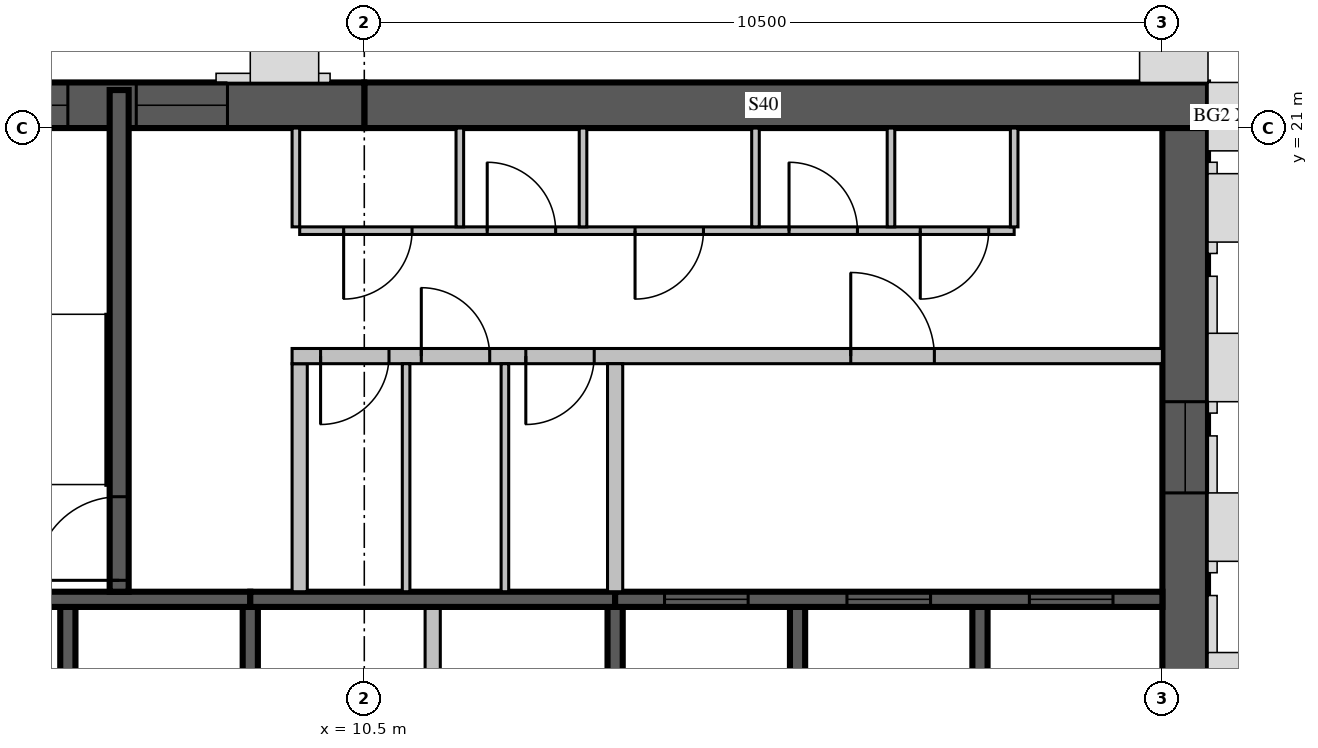
"""IFC4 building model, lengths in metres.
Left out: names, types, materials, properties, quantities, classifications, styles, units other than length and angle.
Written with IfcOpenShell. Run it as: python <this file> out.ifc"""

import sys

from ifc_helpers import new_model, si_unit, direction, frame, frame_2d, origin, place, context, subcontext, project, spatial, rectangle, extrude, source, transform, mapped, element, fill, save


model = new_model("IFC4")
c1 = context("Model", 3, precision=1e-05, world=origin(), true_north=direction((0.0, 1.0)))
c2 = subcontext(c1, "Body", "Model", "MODEL_VIEW")
j1 = project(units=[si_unit("LENGTHUNIT", "METRE"), si_unit("PLANEANGLEUNIT", "RADIAN")], contexts=[c1])
p1 = place(None, origin())
s1 = spatial("IfcSite", under=j1, at=p1, CompositionType="ELEMENT")
p2 = place(p1, origin())
s2 = spatial("IfcBuilding", under=s1, at=p2, CompositionType="ELEMENT")
p3 = place(p2, frame((0.0, 0.0, 312.5)))
s3 = spatial("IfcBuildingStorey", under=s2, at=p3, CompositionType="ELEMENT", Elevation=312.5)
m1 = source(origin(), c2, "Body", "SweptSolid", [
    extrude(rectangle(XDim=11.1, YDim=0.6, at=frame_2d((5.55, 0.0))), origin(), (0.0, 0.0, 1.0), 3.5),
])
p4 = place(p3, frame((10.5, 21.3, 0.0), z_axis=(0.0, 0.0, 1.0), x_axis=(1.0, 0.0, 0.0)))
e1 = element("IfcWall", 1, at=p4, inside=s3, PredefinedType="SHEAR", context=c2, shape_type="MappedRepresentation", body=[
    mapped(m1, transform((0.0, 0.0, 0.0), scale=1.0)),
])
m2 = source(origin(), c2, "Body", "SweptSolid", [
    extrude(rectangle(XDim=10.5, YDim=0.6, at=frame_2d((5.25, 0.0))), origin(), (0.0, 0.0, 1.0), 3.5),
])
p5 = place(p3, frame((21.3, 10.5, 0.0), z_axis=(0.0, 0.0, 1.0), x_axis=(0.0, 1.0, 0.0)))
e2 = element("IfcWall", 2, at=p5, inside=s3, PredefinedType="SHEAR", context=c2, shape_type="MappedRepresentation", body=[
    mapped(m2, transform((0.0, 0.0, 0.0), scale=1.0)),
])
m3 = source(origin(), c2, "Body", "SweptSolid", [
    extrude(rectangle(XDim=1.2, YDim=2.4, at=frame_2d((0.6, 1.2))), frame((0.0, 0.31, 0.0), z_axis=(0.0, -1.0, 0.0), x_axis=(1.0, 0.0, 0.0)), (0.0, 0.0, 1.0), 0.62),
])
p6 = place(p5, frame((5.7, 0.0, 0.6)))
e3 = element("IfcOpeningElement", 3, at=p6, cuts=e2, PredefinedType="OPENING", context=c2, shape_type="MappedRepresentation", body=[
    mapped(m3, transform((0.0, 0.0, 0.0), scale=1.0)),
])
m4 = source(origin(), c2, "Body", "SweptSolid", [
    extrude(rectangle(XDim=6.6, YDim=0.6, at=frame_2d((3.3, 0.0))), origin(), (0.0, 0.0, 1.0), 3.5),
])
p7 = place(p3, frame((3.9, 21.3, 0.0), z_axis=(0.0, 0.0, 1.0), x_axis=(1.0, 0.0, 0.0)))
e4 = element("IfcWall", 4, at=p7, inside=s3, PredefinedType="SHEAR", context=c2, shape_type="MappedRepresentation", body=[
    mapped(m4, transform((0.0, 0.0, 0.0), scale=1.0)),
])
p8 = place(p7, frame((1.5, 0.0, 0.6)))
e5 = element("IfcOpeningElement", 5, at=p8, cuts=e4, PredefinedType="OPENING", context=c2, shape_type="MappedRepresentation", body=[
    mapped(m3, transform((0.0, 0.0, 0.0), scale=1.0)),
])
p9 = place(p7, frame((3.6, 0.0, 0.6)))
e6 = element("IfcOpeningElement", 6, at=p9, cuts=e4, PredefinedType="OPENING", context=c2, shape_type="MappedRepresentation", body=[
    mapped(m3, transform((0.0, 0.0, 0.0), scale=1.0)),
])
m5 = source(origin(), c2, "Body", "SweptSolid", [
    extrude(rectangle(XDim=3.0, YDim=0.2, at=frame_2d((1.5, 0.0))), origin(), (0.0, 0.0, 1.0), 3.5),
])
p10 = place(p3, frame((6.6, 11.7, 0.0), z_axis=(0.0, 0.0, 1.0), x_axis=(0.0, 1.0, 0.0)))
e7 = element("IfcWall", 7, at=p10, inside=s3, PredefinedType="SOLIDWALL", context=c2, shape_type="MappedRepresentation", body=[
    mapped(m5, transform((0.0, 0.0, 0.0), scale=1.0)),
])
m6 = source(origin(), c2, "Body", "SweptSolid", [
    extrude(rectangle(XDim=3.0, YDim=0.2, at=frame_2d((1.5, 0.0))), origin(), (0.0, 0.0, 1.0), 3.1),
])
for number, where, z_axis, x_axis in (
    (8, (9.0, 11.7, 0.0), (0.0, 0.0, 1.0), (0.0, 1.0, 0.0)),
    (9, (13.8, 11.7, 0.0), (0.0, 0.0, 1.0), (0.0, 1.0, 0.0)),
):
    element("IfcWall", number, at=place(p3, frame(where, z_axis=z_axis, x_axis=x_axis)), inside=s3, PredefinedType="SOLIDWALL", context=c2, shape_type="MappedRepresentation", body=[
        mapped(m6, transform((0.0, 0.0, 0.0), scale=1.0)),
    ])
for number, where, z_axis, x_axis in (
    (10, (16.2, 11.7, 0.0), (0.0, 0.0, 1.0), (0.0, 1.0, 0.0)),
    (11, (18.6, 11.7, 0.0), (0.0, 0.0, 1.0), (0.0, 1.0, 0.0)),
):
    element("IfcWall", number, at=place(p3, frame(where, z_axis=z_axis, x_axis=x_axis)), inside=s3, PredefinedType="SOLIDWALL", context=c2, shape_type="MappedRepresentation", body=[
        mapped(m5, transform((0.0, 0.0, 0.0), scale=1.0)),
    ])
m7 = source(origin(), c2, "Body", "SweptSolid", [
    extrude(rectangle(XDim=3.0, YDim=0.2, at=frame_2d((1.5, 0.0))), origin(), (0.0, 0.0, 1.0), 3.1),
])
p11 = place(p3, frame((11.4, 11.7, 0.0), z_axis=(0.0, 0.0, 1.0), x_axis=(0.0, 1.0, 0.0)))
e12 = element("IfcWall", 12, at=p11, inside=s3, PredefinedType="PARTITIONING", context=c2, shape_type="MappedRepresentation", body=[
    mapped(m7, transform((0.0, 0.0, 0.0), scale=1.0)),
])
m8 = source(origin(), c2, "Body", "SweptSolid", [
    extrude(rectangle(XDim=4.8, YDim=0.2, at=frame_2d((2.4, 0.0))), origin(), (0.0, 0.0, 1.0), 3.5),
])
p12 = place(p3, frame((4.2, 14.8, 0.0), z_axis=(0.0, 0.0, 1.0), x_axis=(1.0, 0.0, 0.0)))
e13 = element("IfcWall", 13, at=p12, inside=s3, PredefinedType="SOLIDWALL", context=c2, shape_type="MappedRepresentation", body=[
    mapped(m8, transform((0.0, 0.0, 0.0), scale=1.0)),
])
m9 = source(origin(), c2, "Body", "SweptSolid", [
    extrude(rectangle(XDim=4.8, YDim=0.2, at=frame_2d((2.4, 0.0))), origin(), (0.0, 0.0, 1.0), 3.1),
])
p13 = place(p3, frame((9.0, 14.8, 0.0), z_axis=(0.0, 0.0, 1.0), x_axis=(1.0, 0.0, 0.0)))
e14 = element("IfcWall", 14, at=p13, inside=s3, PredefinedType="SOLIDWALL", context=c2, shape_type="MappedRepresentation", body=[
    mapped(m9, transform((0.0, 0.0, 0.0), scale=1.0)),
])
m10 = source(origin(), c2, "Body", "SweptSolid", [
    extrude(rectangle(XDim=7.2, YDim=0.2, at=frame_2d((3.6, 0.0))), origin(), (0.0, 0.0, 1.0), 3.5),
])
p14 = place(p3, frame((13.8, 14.8, 0.0), z_axis=(0.0, 0.0, 1.0), x_axis=(1.0, 0.0, 0.0)))
e15 = element("IfcWall", 15, at=p14, inside=s3, PredefinedType="SOLIDWALL", context=c2, shape_type="MappedRepresentation", body=[
    mapped(m10, transform((0.0, 0.0, 0.0), scale=1.0)),
])
m11 = source(origin(), c2, "Body", "SweptSolid", [
    extrude(rectangle(XDim=1.1, YDim=2.1, at=frame_2d((0.55, 1.05))), frame((0.0, 0.11, 0.0), z_axis=(0.0, -1.0, 0.0), x_axis=(1.0, 0.0, 0.0)), (0.0, 0.0, 1.0), 0.22),
])
p15 = place(p14, frame((0.65, 0.0, 0.0)))
e16 = element("IfcOpeningElement", 16, at=p15, cuts=e15, PredefinedType="OPENING", context=c2, shape_type="MappedRepresentation", body=[
    mapped(m11, transform((0.0, 0.0, 0.0), scale=1.0)),
])
p16 = place(p14, frame((3.05, 0.0, 0.0)))
e17 = element("IfcOpeningElement", 17, at=p16, cuts=e15, PredefinedType="OPENING", context=c2, shape_type="MappedRepresentation", body=[
    mapped(m11, transform((0.0, 0.0, 0.0), scale=1.0)),
])
p17 = place(p14, frame((5.45, 0.0, 0.0)))
e18 = element("IfcOpeningElement", 18, at=p17, cuts=e15, PredefinedType="OPENING", context=c2, shape_type="MappedRepresentation", body=[
    mapped(m11, transform((0.0, 0.0, 0.0), scale=1.0)),
])
m12 = source(origin(), c2, "Body", "SweptSolid", [
    extrude(rectangle(XDim=6.6, YDim=0.25, at=frame_2d((3.3, 0.0))), origin(), (0.0, 0.0, 1.0), 3.1),
])
p18 = place(p3, frame((7.275, 14.9, 0.0), z_axis=(0.0, 0.0, 1.0), x_axis=(0.0, 1.0, 0.0)))
e19 = element("IfcWall", 19, at=p18, inside=s3, PredefinedType="SOLIDWALL", context=c2, shape_type="MappedRepresentation", body=[
    mapped(m12, transform((0.0, 0.0, 0.0), scale=1.0)),
])
m13 = source(origin(), c2, "Body", "SweptSolid", [
    extrude(rectangle(XDim=1.1, YDim=2.1, at=frame_2d((0.55, 1.05))), frame((0.0, 0.135, 0.0), z_axis=(0.0, -1.0, 0.0), x_axis=(1.0, 0.0, 0.0)), (0.0, 0.0, 1.0), 0.27),
])
p19 = place(p18, frame((0.15, 0.0, 0.0)))
e20 = element("IfcOpeningElement", 20, at=p19, cuts=e19, PredefinedType="OPENING", context=c2, shape_type="MappedRepresentation", body=[
    mapped(m13, transform((0.0, 0.0, 0.0), scale=1.0)),
])
p20 = place(p3, frame((9.65, 14.9, 0.0), z_axis=(0.0, 0.0, 1.0), x_axis=(0.0, 1.0, 0.0)))
e21 = element("IfcWall", 21, at=p20, inside=s3, PredefinedType="PARTITIONING", context=c2, shape_type="MappedRepresentation", body=[
    mapped(m7, transform((0.0, 0.0, 0.0), scale=1.0)),
])
m14 = source(origin(), c2, "Body", "SweptSolid", [
    extrude(rectangle(XDim=11.45, YDim=0.2, at=frame_2d((5.725, 0.0))), origin(), (0.0, 0.0, 1.0), 3.1),
])
p21 = place(p3, frame((9.55, 18.0, 0.0), z_axis=(0.0, 0.0, 1.0), x_axis=(1.0, 0.0, 0.0)))
e22 = element("IfcWall", 22, at=p21, inside=s3, PredefinedType="PARTITIONING", context=c2, shape_type="MappedRepresentation", body=[
    mapped(m14, transform((0.0, 0.0, 0.0), scale=1.0)),
])
m15 = source(origin(), c2, "Body", "SweptSolid", [
    extrude(rectangle(XDim=0.9, YDim=2.1, at=frame_2d((0.45, 1.05))), frame((0.0, 0.11, 0.0), z_axis=(0.0, -1.0, 0.0), x_axis=(1.0, 0.0, 0.0)), (0.0, 0.0, 1.0), 0.22),
])
p22 = place(p21, frame((0.375, 0.0, 0.0)))
e23 = element("IfcOpeningElement", 23, at=p22, cuts=e22, PredefinedType="OPENING", context=c2, shape_type="MappedRepresentation", body=[
    mapped(m15, transform((0.0, 0.0, 0.0), scale=1.0)),
])
p23 = place(p21, frame((1.7, 0.0, 0.0)))
e24 = element("IfcOpeningElement", 24, at=p23, cuts=e22, PredefinedType="OPENING", context=c2, shape_type="MappedRepresentation", body=[
    mapped(m15, transform((0.0, 0.0, 0.0), scale=1.0)),
])
p24 = place(p21, frame((3.075, 0.0, 0.0)))
e25 = element("IfcOpeningElement", 25, at=p24, cuts=e22, PredefinedType="OPENING", context=c2, shape_type="MappedRepresentation", body=[
    mapped(m15, transform((0.0, 0.0, 0.0), scale=1.0)),
])
p25 = place(p21, frame((7.35, 0.0, 0.0)))
e26 = element("IfcOpeningElement", 26, at=p25, cuts=e22, PredefinedType="OPENING", context=c2, shape_type="MappedRepresentation", body=[
    mapped(m11, transform((0.0, 0.0, 0.0), scale=1.0)),
])
m16 = source(origin(), c2, "Body", "SweptSolid", [
    extrude(rectangle(XDim=9.4, YDim=0.1, at=frame_2d((4.7, 0.0))), origin(), (0.0, 0.0, 1.0), 3.1),
])
p26 = place(p3, frame((9.65, 19.65, 0.0), z_axis=(0.0, 0.0, 1.0), x_axis=(1.0, 0.0, 0.0)))
e27 = element("IfcWall", 27, at=p26, inside=s3, PredefinedType="PARTITIONING", context=c2, shape_type="MappedRepresentation", body=[
    mapped(m16, transform((0.0, 0.0, 0.0), scale=1.0)),
])
m17 = source(origin(), c2, "Body", "SweptSolid", [
    extrude(rectangle(XDim=0.9, YDim=2.1, at=frame_2d((0.45, 1.05))), frame((0.0, 0.06, 0.0), z_axis=(0.0, -1.0, 0.0), x_axis=(1.0, 0.0, 0.0)), (0.0, 0.0, 1.0), 0.12),
])
p27 = place(p26, frame((0.578, 0.0, 0.0)))
e28 = element("IfcOpeningElement", 28, at=p27, cuts=e27, PredefinedType="OPENING", context=c2, shape_type="MappedRepresentation", body=[
    mapped(m17, transform((0.0, 0.0, 0.0), scale=1.0)),
])
p28 = place(p26, frame((2.467, 0.0, 0.0)))
e29 = element("IfcOpeningElement", 29, at=p28, cuts=e27, PredefinedType="OPENING", context=c2, shape_type="MappedRepresentation", body=[
    mapped(m17, transform((0.0, 0.0, 0.0), scale=1.0)),
])
p29 = place(p26, frame((4.412, 0.0, 0.0)))
e30 = element("IfcOpeningElement", 30, at=p29, cuts=e27, PredefinedType="OPENING", context=c2, shape_type="MappedRepresentation", body=[
    mapped(m17, transform((0.0, 0.0, 0.0), scale=1.0)),
])
p30 = place(p26, frame((6.438, 0.0, 0.0)))
e31 = element("IfcOpeningElement", 31, at=p30, cuts=e27, PredefinedType="OPENING", context=c2, shape_type="MappedRepresentation", body=[
    mapped(m17, transform((0.0, 0.0, 0.0), scale=1.0)),
])
p31 = place(p26, frame((8.165, 0.0, 0.0)))
e32 = element("IfcOpeningElement", 32, at=p31, cuts=e27, PredefinedType="OPENING", context=c2, shape_type="MappedRepresentation", body=[
    mapped(m17, transform((0.0, 0.0, 0.0), scale=1.0)),
])
m18 = source(origin(), c2, "Body", "SweptSolid", [
    extrude(rectangle(XDim=1.3, YDim=0.1, at=frame_2d((0.65, 0.0))), origin(), (0.0, 0.0, 1.0), 3.1),
])
for number, where, z_axis, x_axis in (
    (33, (11.757, 19.7, 0.0), (0.0, 0.0, 1.0), (0.0, 1.0, 0.0)),
    (34, (13.378, 19.7, 0.0), (0.0, 0.0, 1.0), (0.0, 1.0, 0.0)),
    (35, (15.647, 19.7, 0.0), (0.0, 0.0, 1.0), (0.0, 1.0, 0.0)),
    (36, (17.429, 19.7, 0.0), (0.0, 0.0, 1.0), (0.0, 1.0, 0.0)),
    (37, (9.6, 19.7, 0.0), (0.0, 0.0, 1.0), (0.0, 1.0, 0.0)),
    (38, (19.05, 19.7, 0.0), (0.0, 0.0, 1.0), (0.0, 1.0, 0.0)),
):
    element("IfcWall", number, at=place(p3, frame(where, z_axis=z_axis, x_axis=x_axis)), inside=s3, PredefinedType="PARTITIONING", context=c2, shape_type="MappedRepresentation", body=[
        mapped(m18, transform((0.0, 0.0, 0.0), scale=1.0)),
    ])
p32 = place(p3, frame((13.8, 14.9, 0.0), z_axis=(0.0, 0.0, 1.0), x_axis=(0.0, 1.0, 0.0)))
e39 = element("IfcWall", 39, at=p32, inside=s3, PredefinedType="PARTITIONING", context=c2, shape_type="MappedRepresentation", body=[
    mapped(m7, transform((0.0, 0.0, 0.0), scale=1.0)),
])
m19 = source(origin(), c2, "Body", "SweptSolid", [
    extrude(rectangle(XDim=3.0, YDim=0.1, at=frame_2d((1.5, 0.0))), origin(), (0.0, 0.0, 1.0), 3.1),
])
for number, where, z_axis, x_axis in (
    (40, (11.05, 14.9, 0.0), (0.0, 0.0, 1.0), (0.0, 1.0, 0.0)),
    (41, (12.35, 14.9, 0.0), (0.0, 0.0, 1.0), (0.0, 1.0, 0.0)),
):
    element("IfcWall", number, at=place(p3, frame(where, z_axis=z_axis, x_axis=x_axis)), inside=s3, PredefinedType="PARTITIONING", context=c2, shape_type="MappedRepresentation", body=[
        mapped(m19, transform((0.0, 0.0, 0.0), scale=1.0)),
    ])
m20 = source(origin(), c2, "Body", "SweptSolid", [
    extrude(rectangle(XDim=1.1, YDim=2.1, at=frame_2d((0.55, 1.05))), frame((0.0, 0.025, 0.0), z_axis=(0.0, -1.0, 0.0), x_axis=(1.0, 0.0, 0.0)), (0.0, 0.0, 1.0), 0.05),
])
p33 = place(p15, origin())
e42 = element("IfcDoor", 42, at=p33, inside=s3, OperationType="SLIDING_TO_LEFT", PredefinedType="DOOR", context=c2, shape_type="MappedRepresentation", body=[
    mapped(m20, transform((0.0, 0.0, 0.0), scale=1.0)),
])
fill(e16, e42)
p34 = place(p16, origin())
e43 = element("IfcDoor", 43, at=p34, inside=s3, OperationType="SLIDING_TO_LEFT", PredefinedType="DOOR", context=c2, shape_type="MappedRepresentation", body=[
    mapped(m20, transform((0.0, 0.0, 0.0), scale=1.0)),
])
fill(e17, e43)
p35 = place(p17, origin())
e44 = element("IfcDoor", 44, at=p35, inside=s3, OperationType="SLIDING_TO_LEFT", PredefinedType="DOOR", context=c2, shape_type="MappedRepresentation", body=[
    mapped(m20, transform((0.0, 0.0, 0.0), scale=1.0)),
])
fill(e18, e44)
p36 = place(p19, origin())
e45 = element("IfcDoor", 45, at=p36, inside=s3, OperationType="SINGLE_SWING_LEFT", PredefinedType="DOOR", context=c2, shape_type="MappedRepresentation", body=[
    mapped(m20, transform((0.0, 0.0, 0.0), scale=1.0)),
])
fill(e20, e45)
m21 = source(origin(), c2, "Body", "SweptSolid", [
    extrude(rectangle(XDim=0.9, YDim=2.1, at=frame_2d((0.45, 1.05))), frame((0.0, 0.025, 0.0), z_axis=(0.0, -1.0, 0.0), x_axis=(1.0, 0.0, 0.0)), (0.0, 0.0, 1.0), 0.05),
])
p37 = place(p22, origin())
e46 = element("IfcDoor", 46, at=p37, inside=s3, OperationType="SINGLE_SWING_RIGHT", PredefinedType="DOOR", context=c2, shape_type="MappedRepresentation", body=[
    mapped(m21, transform((0.0, 0.0, 0.0), scale=1.0)),
])
fill(e23, e46)
p38 = place(p23, origin())
e47 = element("IfcDoor", 47, at=p38, inside=s3, OperationType="SINGLE_SWING_LEFT", PredefinedType="DOOR", context=c2, shape_type="MappedRepresentation", body=[
    mapped(m21, transform((0.0, 0.0, 0.0), scale=1.0)),
])
fill(e24, e47)
p39 = place(p24, origin())
e48 = element("IfcDoor", 48, at=p39, inside=s3, OperationType="SINGLE_SWING_RIGHT", PredefinedType="DOOR", context=c2, shape_type="MappedRepresentation", body=[
    mapped(m21, transform((0.0, 0.0, 0.0), scale=1.0)),
])
fill(e25, e48)
p40 = place(p25, origin())
e49 = element("IfcDoor", 49, at=p40, inside=s3, OperationType="SINGLE_SWING_LEFT", PredefinedType="DOOR", context=c2, shape_type="MappedRepresentation", body=[
    mapped(m20, transform((0.0, 0.0, 0.0), scale=1.0)),
])
fill(e26, e49)
p41 = place(p27, origin())
e50 = element("IfcDoor", 50, at=p41, inside=s3, OperationType="SINGLE_SWING_RIGHT", PredefinedType="DOOR", context=c2, shape_type="MappedRepresentation", body=[
    mapped(m21, transform((0.0, 0.0, 0.0), scale=1.0)),
])
fill(e28, e50)
p42 = place(p28, origin())
e51 = element("IfcDoor", 51, at=p42, inside=s3, OperationType="SINGLE_SWING_LEFT", PredefinedType="DOOR", context=c2, shape_type="MappedRepresentation", body=[
    mapped(m21, transform((0.0, 0.0, 0.0), scale=1.0)),
])
fill(e29, e51)
p43 = place(p29, origin())
e52 = element("IfcDoor", 52, at=p43, inside=s3, OperationType="SINGLE_SWING_RIGHT", PredefinedType="DOOR", context=c2, shape_type="MappedRepresentation", body=[
    mapped(m21, transform((0.0, 0.0, 0.0), scale=1.0)),
])
fill(e30, e52)
p44 = place(p30, origin())
e53 = element("IfcDoor", 53, at=p44, inside=s3, OperationType="SINGLE_SWING_LEFT", PredefinedType="DOOR", context=c2, shape_type="MappedRepresentation", body=[
    mapped(m21, transform((0.0, 0.0, 0.0), scale=1.0)),
])
fill(e31, e53)
p45 = place(p31, origin())
e54 = element("IfcDoor", 54, at=p45, inside=s3, OperationType="SINGLE_SWING_RIGHT", PredefinedType="DOOR", context=c2, shape_type="MappedRepresentation", body=[
    mapped(m21, transform((0.0, 0.0, 0.0), scale=1.0)),
])
fill(e32, e54)
m22 = source(origin(), c2, "Body", "SweptSolid", [
    extrude(rectangle(XDim=1.2, YDim=2.4, at=frame_2d((0.6, 1.2))), frame((0.0, 0.03, 0.0), z_axis=(0.0, -1.0, 0.0), x_axis=(1.0, 0.0, 0.0)), (0.0, 0.0, 1.0), 0.06),
])
p46 = place(p6, origin())
e55 = element("IfcWindow", 55, at=p46, inside=s3, PartitioningType="SINGLE_PANEL", PredefinedType="WINDOW", context=c2, shape_type="MappedRepresentation", body=[
    mapped(m22, transform((0.0, 0.0, 0.0), scale=1.0)),
])
fill(e3, e55)
p47 = place(p8, origin())
e56 = element("IfcWindow", 56, at=p47, inside=s3, PartitioningType="SINGLE_PANEL", PredefinedType="WINDOW", context=c2, shape_type="MappedRepresentation", body=[
    mapped(m22, transform((0.0, 0.0, 0.0), scale=1.0)),
])
fill(e5, e56)
p48 = place(p9, origin())
e57 = element("IfcWindow", 57, at=p48, inside=s3, PartitioningType="SINGLE_PANEL", PredefinedType="WINDOW", context=c2, shape_type="MappedRepresentation", body=[
    mapped(m22, transform((0.0, 0.0, 0.0), scale=1.0)),
])
fill(e6, e57)
save(model, sys.argv[1])
